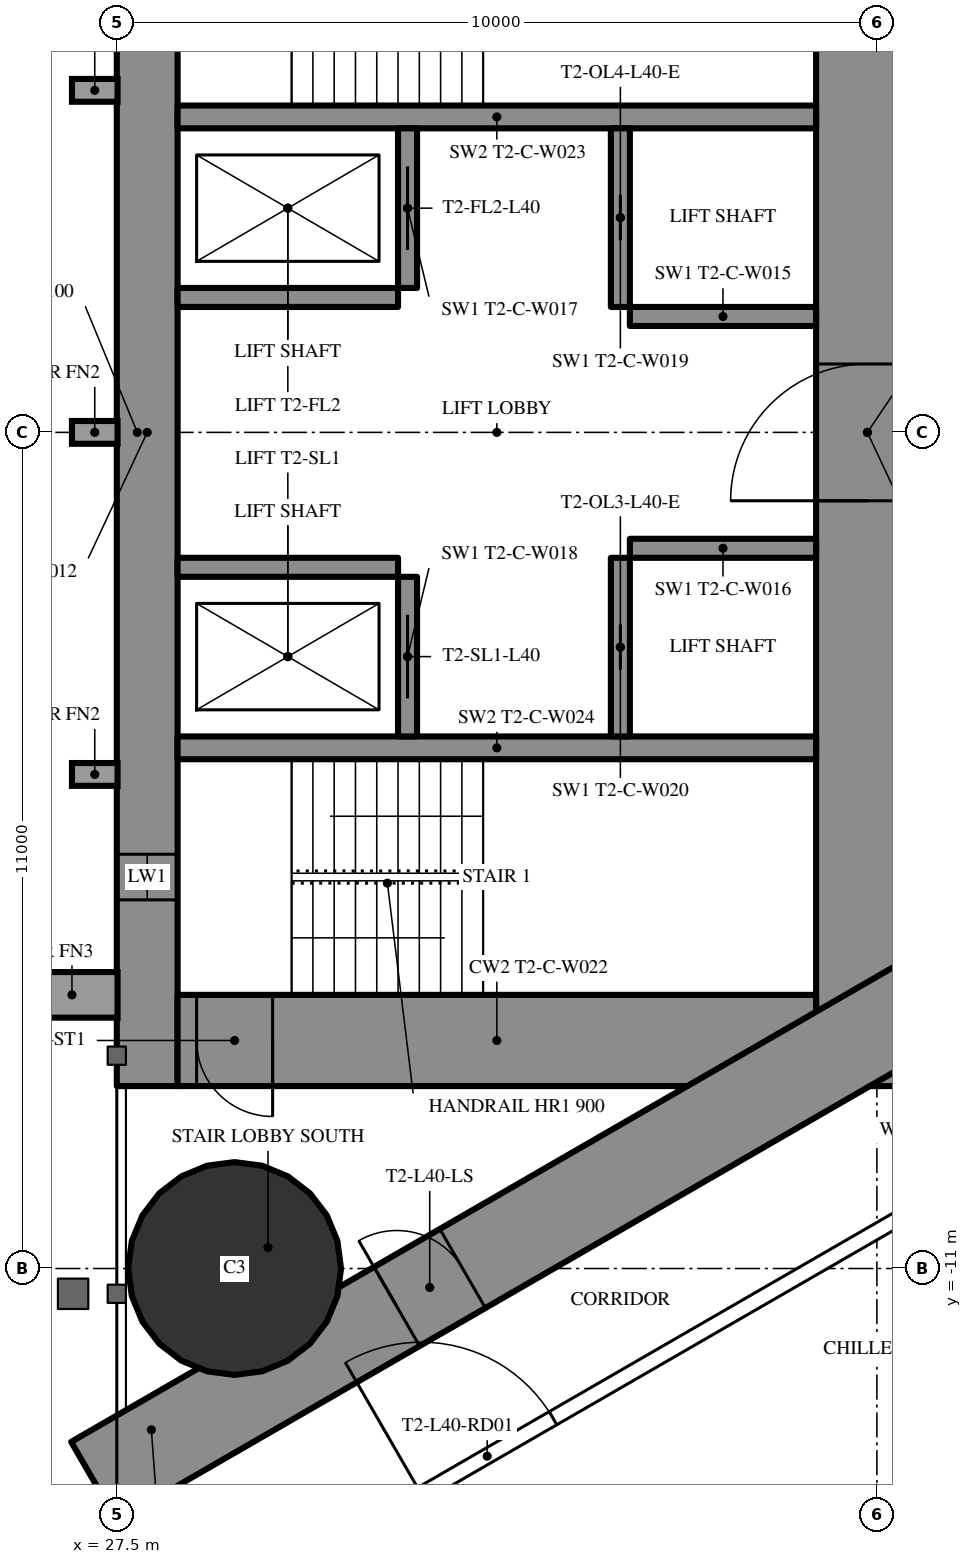
"""IFC4 building model, lengths in metres.
Left out: names, types, materials, properties, quantities, classifications, styles, units other than length and angle.
Written with IfcOpenShell. Run it as: python <this file> out.ifc"""

import sys

from ifc_helpers import new_model, si_unit, direction, frame, frame_2d, origin, origin_2d, place, context, subcontext, project, spatial, rectangle, circle, extrude, element, fill, save


model = new_model("IFC4")
c1 = context("Model", 3, precision=1e-05, world=origin(), true_north=direction((0.0, 1.0)))
c2 = subcontext(c1, "Body", "Model", "MODEL_VIEW")
j1 = project(units=[si_unit("LENGTHUNIT", "METRE"), si_unit("PLANEANGLEUNIT", "RADIAN")], contexts=[c1])
p1 = place(None, origin())
s1 = spatial("IfcSite", under=j1, at=p1, CompositionType="ELEMENT")
p2 = place(p1, origin())
s2 = spatial("IfcBuilding", under=s1, at=p2, CompositionType="ELEMENT")
p3 = place(p2, frame((0.0, 0.0, 152.7)))
s3 = spatial("IfcBuildingStorey", under=s2, at=p3, CompositionType="ELEMENT", Elevation=152.7)
p4 = place(p3, frame((29.05, -11.0, 0.0), z_axis=(0.0, 0.0, 1.0), x_axis=(1.0, 0.0, 0.0)))
e1 = element("IfcColumn", 1, at=p4, inside=s3, PredefinedType="COLUMN", context=c2, shape_type="SweptSolid", body=[
    extrude(circle(Radius=1.4, at=origin_2d()), origin(), (0.0, 0.0, 1.0), 3.6),
])
p5 = place(p3, frame((27.9, -8.6, 0.0), z_axis=(0.0, 0.0, 1.0), x_axis=(0.0, 1.0, 0.0)))
e2 = element("IfcWall", 2, at=p5, inside=s3, PredefinedType="SHEAR", context=c2, shape_type="SweptSolid", body=[
    extrude(rectangle(XDim=17.2, YDim=0.8, at=frame_2d((8.6, 0.0))), origin(), (0.0, 0.0, 1.0), 3.6),
])
p6 = place(p5, frame((2.45, 0.0, 0.6)))
e3 = element("IfcOpeningElement", 3, at=p6, cuts=e2, PredefinedType="OPENING", context=c2, shape_type="SweptSolid", body=[
    extrude(rectangle(XDim=0.6, YDim=2.1, at=frame_2d((0.3, 1.05))), frame((0.0, 0.41, 0.0), z_axis=(0.0, -1.0, 0.0), x_axis=(1.0, 0.0, 0.0)), (0.0, 0.0, 1.0), 0.82),
])
p7 = place(p5, frame((14.15, 0.0, 0.6)))
e4 = element("IfcOpeningElement", 4, at=p7, cuts=e2, PredefinedType="OPENING", context=c2, shape_type="SweptSolid", body=[
    extrude(rectangle(XDim=0.6, YDim=2.1, at=frame_2d((0.3, 1.05))), frame((0.0, 0.41, 0.0), z_axis=(0.0, -1.0, 0.0), x_axis=(1.0, 0.0, 0.0)), (0.0, 0.0, 1.0), 0.82),
])
p8 = place(p3, frame((37.375, -8.6, 0.0), z_axis=(0.0, 0.0, 1.0), x_axis=(0.0, 1.0, 0.0)))
e5 = element("IfcWall", 5, at=p8, inside=s3, PredefinedType="SHEAR", context=c2, shape_type="SweptSolid", body=[
    extrude(rectangle(XDim=17.2, YDim=1.35, at=frame_2d((8.6, 0.0))), origin(), (0.0, 0.0, 1.0), 3.6),
])
p9 = place(p8, frame((7.7, 0.0, 0.0)))
e6 = element("IfcOpeningElement", 6, at=p9, cuts=e5, PredefinedType="OPENING", context=c2, shape_type="SweptSolid", body=[
    extrude(rectangle(XDim=1.8, YDim=2.2, at=frame_2d((0.9, 1.1))), frame((0.0, 0.685, 0.0), z_axis=(0.0, -1.0, 0.0), x_axis=(1.0, 0.0, 0.0)), (0.0, 0.0, 1.0), 1.37),
])
p10 = place(p3, frame((28.3, -8.0, 0.0), z_axis=(0.0, 0.0, 1.0), x_axis=(1.0, 0.0, 0.0)))
e7 = element("IfcWall", 7, at=p10, inside=s3, PredefinedType="SHEAR", context=c2, shape_type="SweptSolid", body=[
    extrude(rectangle(XDim=8.4, YDim=1.2, at=frame_2d((4.2, 0.0))), origin(), (0.0, 0.0, 1.0), 3.6),
])
p11 = place(p10, frame((0.25, 0.0, 0.0)))
e8 = element("IfcOpeningElement", 8, at=p11, cuts=e7, PredefinedType="OPENING", context=c2, shape_type="SweptSolid", body=[
    extrude(rectangle(XDim=1.0, YDim=2.2, at=frame_2d((0.5, 1.1))), frame((0.0, 0.61, 0.0), z_axis=(0.0, -1.0, 0.0), x_axis=(1.0, 0.0, 0.0)), (0.0, 0.0, 1.0), 1.22),
])
for number, where, z_axis, x_axis in (
    (9, (28.3, -4.15, 0.0), (0.0, 0.0, 1.0), (1.0, 0.0, 0.0)),
    (10, (28.3, 4.15, 0.0), (0.0, 0.0, 1.0), (1.0, 0.0, 0.0)),
):
    element("IfcWall", number, at=place(p3, frame(where, z_axis=z_axis, x_axis=x_axis)), inside=s3, PredefinedType="SHEAR", context=c2, shape_type="SweptSolid", body=[
        extrude(rectangle(XDim=8.4, YDim=0.3, at=frame_2d((4.2, 0.0))), origin(), (0.0, 0.0, 1.0), 3.6),
    ])
p12 = place(p3, frame((31.325, -4.0, 0.0), z_axis=(0.0, 0.0, 1.0), x_axis=(0.0, 1.0, 0.0)))
e11 = element("IfcWall", 11, at=p12, inside=s3, PredefinedType="SHEAR", context=c2, shape_type="SweptSolid", body=[
    extrude(rectangle(XDim=2.1, YDim=0.25, at=frame_2d((1.05, 0.0))), origin(), (0.0, 0.0, 1.0), 3.6),
])
p13 = place(p12, frame((0.5, 0.0, 0.0)))
e12 = element("IfcOpeningElement", 12, at=p13, cuts=e11, PredefinedType="OPENING", context=c2, shape_type="SweptSolid", body=[
    extrude(rectangle(XDim=1.1, YDim=2.2, at=frame_2d((0.55, 1.1))), frame((0.0, 0.135, 0.0), z_axis=(0.0, -1.0, 0.0), x_axis=(1.0, 0.0, 0.0)), (0.0, 0.0, 1.0), 0.27),
])
p14 = place(p3, frame((34.125, -4.0, 0.0), z_axis=(0.0, 0.0, 1.0), x_axis=(0.0, 1.0, 0.0)))
e13 = element("IfcWall", 13, at=p14, inside=s3, PredefinedType="SHEAR", context=c2, shape_type="SweptSolid", body=[
    extrude(rectangle(XDim=2.35, YDim=0.25, at=frame_2d((1.175, 0.0))), origin(), (0.0, 0.0, 1.0), 3.6),
])
p15 = place(p14, frame((0.875, 0.0, 0.0)))
e14 = element("IfcOpeningElement", 14, at=p15, cuts=e13, PredefinedType="OPENING", context=c2, shape_type="SweptSolid", body=[
    extrude(rectangle(XDim=0.6, YDim=2.0, at=frame_2d((0.3, 1.0))), frame((0.0, 0.135, 0.0), z_axis=(0.0, -1.0, 0.0), x_axis=(1.0, 0.0, 0.0)), (0.0, 0.0, 1.0), 0.27),
])
p16 = place(p3, frame((28.3, -1.775, 0.0), z_axis=(0.0, 0.0, 1.0), x_axis=(1.0, 0.0, 0.0)))
e15 = element("IfcWall", 15, at=p16, inside=s3, PredefinedType="SHEAR", context=c2, shape_type="SweptSolid", body=[
    extrude(rectangle(XDim=2.9, YDim=0.25, at=frame_2d((1.45, 0.0))), origin(), (0.0, 0.0, 1.0), 3.6),
])
p17 = place(p3, frame((34.25, -1.525, 0.0), z_axis=(0.0, 0.0, 1.0), x_axis=(1.0, 0.0, 0.0)))
e16 = element("IfcWall", 16, at=p17, inside=s3, PredefinedType="SHEAR", context=c2, shape_type="SweptSolid", body=[
    extrude(rectangle(XDim=2.45, YDim=0.25, at=frame_2d((1.225, 0.0))), origin(), (0.0, 0.0, 1.0), 3.6),
])
p18 = place(p3, frame((31.325, 1.9, 0.0), z_axis=(0.0, 0.0, 1.0), x_axis=(0.0, 1.0, 0.0)))
e17 = element("IfcWall", 17, at=p18, inside=s3, PredefinedType="SHEAR", context=c2, shape_type="SweptSolid", body=[
    extrude(rectangle(XDim=2.1, YDim=0.25, at=frame_2d((1.05, 0.0))), origin(), (0.0, 0.0, 1.0), 3.6),
])
p19 = place(p18, frame((0.5, 0.0, 0.0)))
e18 = element("IfcOpeningElement", 18, at=p19, cuts=e17, PredefinedType="OPENING", context=c2, shape_type="SweptSolid", body=[
    extrude(rectangle(XDim=1.1, YDim=2.2, at=frame_2d((0.55, 1.1))), frame((0.0, 0.135, 0.0), z_axis=(0.0, -1.0, 0.0), x_axis=(1.0, 0.0, 0.0)), (0.0, 0.0, 1.0), 0.27),
])
p20 = place(p3, frame((34.125, 1.65, 0.0), z_axis=(0.0, 0.0, 1.0), x_axis=(0.0, 1.0, 0.0)))
e19 = element("IfcWall", 19, at=p20, inside=s3, PredefinedType="SHEAR", context=c2, shape_type="SweptSolid", body=[
    extrude(rectangle(XDim=2.35, YDim=0.25, at=frame_2d((1.175, 0.0))), origin(), (0.0, 0.0, 1.0), 3.6),
])
p21 = place(p20, frame((0.875, 0.0, 0.0)))
e20 = element("IfcOpeningElement", 20, at=p21, cuts=e19, PredefinedType="OPENING", context=c2, shape_type="SweptSolid", body=[
    extrude(rectangle(XDim=0.6, YDim=2.0, at=frame_2d((0.3, 1.0))), frame((0.0, 0.135, 0.0), z_axis=(0.0, -1.0, 0.0), x_axis=(1.0, 0.0, 0.0)), (0.0, 0.0, 1.0), 0.27),
])
p22 = place(p3, frame((28.3, 1.775, 0.0), z_axis=(0.0, 0.0, 1.0), x_axis=(1.0, 0.0, 0.0)))
e21 = element("IfcWall", 21, at=p22, inside=s3, PredefinedType="SHEAR", context=c2, shape_type="SweptSolid", body=[
    extrude(rectangle(XDim=2.9, YDim=0.25, at=frame_2d((1.45, 0.0))), origin(), (0.0, 0.0, 1.0), 3.6),
])
p23 = place(p3, frame((34.25, 1.525, 0.0), z_axis=(0.0, 0.0, 1.0), x_axis=(1.0, 0.0, 0.0)))
e22 = element("IfcWall", 22, at=p23, inside=s3, PredefinedType="SHEAR", context=c2, shape_type="SweptSolid", body=[
    extrude(rectangle(XDim=2.45, YDim=0.25, at=frame_2d((1.225, 0.0))), origin(), (0.0, 0.0, 1.0), 3.6),
])
p24 = place(p3, frame((27.2, -13.8, 0.0), z_axis=(0.0, 0.0, 1.0), x_axis=(0.866027159892, 0.499996958321, 0.0)))
e23 = element("IfcWall", 23, at=p24, inside=s3, PredefinedType="SHEAR", context=c2, shape_type="SweptSolid", body=[
    extrude(rectangle(XDim=27.947, YDim=1.2, at=frame_2d((13.973, 0.0))), origin(), (0.0, 0.0, 1.0), 3.6),
])
p25 = place(p24, frame((4.6, 0.0, 0.0)))
e24 = element("IfcOpeningElement", 24, at=p25, cuts=e23, PredefinedType="OPENING", context=c2, shape_type="SweptSolid", body=[
    extrude(rectangle(XDim=1.0, YDim=2.2, at=frame_2d((0.5, 1.1))), frame((0.0, 0.61, 0.0), z_axis=(0.0, -1.0, 0.0), x_axis=(1.0, 0.0, 0.0)), (0.0, 0.0, 1.0), 1.22),
])
p26 = place(p24, frame((13.568, 0.0, 0.0)))
e25 = element("IfcOpeningElement", 25, at=p26, cuts=e23, PredefinedType="OPENING", context=c2, shape_type="SweptSolid", body=[
    extrude(rectangle(XDim=1.8, YDim=2.04, at=frame_2d((0.9, 1.02))), frame((0.0, 0.61, 0.0), z_axis=(0.0, -1.0, 0.0), x_axis=(1.0, 0.0, 0.0)), (0.0, 0.0, 1.0), 1.22),
])
p27 = place(p3, frame((27.2, 13.8, 0.0), z_axis=(0.0, 0.0, 1.0), x_axis=(0.866024515034, -0.500001539357, 0.0)))
e26 = element("IfcWall", 26, at=p27, inside=s3, PredefinedType="SHEAR", context=c2, shape_type="SweptSolid", body=[
    extrude(rectangle(XDim=26.907, YDim=1.2, at=frame_2d((13.454, 0.0))), origin(), (0.0, 0.0, 1.0), 3.6),
])
p28 = place(p27, frame((4.6, 0.0, 0.0)))
e27 = element("IfcOpeningElement", 27, at=p28, cuts=e26, PredefinedType="OPENING", context=c2, shape_type="SweptSolid", body=[
    extrude(rectangle(XDim=1.0, YDim=2.2, at=frame_2d((0.5, 1.1))), frame((0.0, 0.61, 0.0), z_axis=(0.0, -1.0, 0.0), x_axis=(1.0, 0.0, 0.0)), (0.0, 0.0, 1.0), 1.22),
])
p29 = place(p27, frame((13.568, 0.0, 0.0)))
e28 = element("IfcOpeningElement", 28, at=p29, cuts=e26, PredefinedType="OPENING", context=c2, shape_type="SweptSolid", body=[
    extrude(rectangle(XDim=1.8, YDim=2.04, at=frame_2d((0.9, 1.02))), frame((0.0, 0.61, 0.0), z_axis=(0.0, -1.0, 0.0), x_axis=(1.0, 0.0, 0.0)), (0.0, 0.0, 1.0), 1.22),
])
p30 = place(p3, frame((27.903, -16.05, 0.0), z_axis=(0.0, 0.0, 1.0), x_axis=(0.86602417537, 0.500002127671, 0.0)))
e29 = element("IfcWall", 29, at=p30, inside=s3, PredefinedType="PARTITIONING", context=c2, shape_type="SweptSolid", body=[
    extrude(rectangle(XDim=24.307, YDim=0.2, at=frame_2d((12.153, 0.0))), origin(), (0.0, 0.0, 1.0), 3.35),
])
p31 = place(p30, frame((4.162, 0.0, 0.0)))
e30 = element("IfcOpeningElement", 30, at=p31, cuts=e29, PredefinedType="OPENING", context=c2, shape_type="SweptSolid", body=[
    extrude(rectangle(XDim=2.0, YDim=2.4, at=frame_2d((1.0, 1.2))), frame((0.0, 0.11, 0.0), z_axis=(0.0, -1.0, 0.0), x_axis=(1.0, 0.0, 0.0)), (0.0, 0.0, 1.0), 0.22),
])
p32 = place(p30, frame((17.678, 0.0, 0.0)))
e31 = element("IfcOpeningElement", 31, at=p32, cuts=e29, PredefinedType="OPENING", context=c2, shape_type="SweptSolid", body=[
    extrude(rectangle(XDim=2.0, YDim=2.4, at=frame_2d((1.0, 1.2))), frame((0.0, 0.11, 0.0), z_axis=(0.0, -1.0, 0.0), x_axis=(1.0, 0.0, 0.0)), (0.0, 0.0, 1.0), 0.22),
])
p33 = place(p31, origin())
e32 = element("IfcDoor", 32, at=p33, inside=s3, OperationType="DOUBLE_DOOR_SINGLE_SWING", PredefinedType="DOOR", context=c2, shape_type="SweptSolid", body=[
    extrude(rectangle(XDim=2.0, YDim=2.4, at=frame_2d((1.0, 1.2))), frame((0.0, 0.025, 0.0), z_axis=(0.0, -1.0, 0.0), x_axis=(1.0, 0.0, 0.0)), (0.0, 0.0, 1.0), 0.05),
])
fill(e30, e32)
p34 = place(p25, origin())
e33 = element("IfcDoor", 33, at=p34, inside=s3, OperationType="SINGLE_SWING_LEFT", PredefinedType="DOOR", context=c2, shape_type="SweptSolid", body=[
    extrude(rectangle(XDim=1.0, YDim=2.2, at=frame_2d((0.5, 1.1))), frame((0.0, 0.025, 0.0), z_axis=(0.0, -1.0, 0.0), x_axis=(1.0, 0.0, 0.0)), (0.0, 0.0, 1.0), 0.05),
])
fill(e24, e33)
p35 = place(p9, origin())
e34 = element("IfcDoor", 34, at=p35, inside=s3, OperationType="DOUBLE_DOOR_SINGLE_SWING", PredefinedType="DOOR", context=c2, shape_type="SweptSolid", body=[
    extrude(rectangle(XDim=1.8, YDim=2.2, at=frame_2d((0.9, 1.1))), frame((0.0, 0.025, 0.0), z_axis=(0.0, -1.0, 0.0), x_axis=(1.0, 0.0, 0.0)), (0.0, 0.0, 1.0), 0.05),
])
fill(e6, e34)
p36 = place(p11, origin())
e35 = element("IfcDoor", 35, at=p36, inside=s3, OperationType="SINGLE_SWING_RIGHT", PredefinedType="DOOR", context=c2, shape_type="SweptSolid", body=[
    extrude(rectangle(XDim=1.0, YDim=2.2, at=frame_2d((0.5, 1.1))), frame((0.0, 0.025, 0.0), z_axis=(0.0, -1.0, 0.0), x_axis=(1.0, 0.0, 0.0)), (0.0, 0.0, 1.0), 0.05),
])
fill(e8, e35)
p37 = place(p13, origin())
e36 = element("IfcDoor", 36, at=p37, inside=s3, OperationType="SLIDING_TO_LEFT", PredefinedType="USERDEFINED", context=c2, shape_type="SweptSolid", body=[
    extrude(rectangle(XDim=1.1, YDim=2.2, at=frame_2d((0.55, 1.1))), frame((0.0, 0.025, 0.0), z_axis=(0.0, -1.0, 0.0), x_axis=(1.0, 0.0, 0.0)), (0.0, 0.0, 1.0), 0.05),
])
fill(e12, e36)
p38 = place(p19, origin())
e37 = element("IfcDoor", 37, at=p38, inside=s3, OperationType="SLIDING_TO_LEFT", PredefinedType="USERDEFINED", context=c2, shape_type="SweptSolid", body=[
    extrude(rectangle(XDim=1.1, YDim=2.2, at=frame_2d((0.55, 1.1))), frame((0.0, 0.025, 0.0), z_axis=(0.0, -1.0, 0.0), x_axis=(1.0, 0.0, 0.0)), (0.0, 0.0, 1.0), 0.05),
])
fill(e18, e37)
p39 = place(p15, origin())
e38 = element("IfcDoor", 38, at=p39, inside=s3, OperationType="SLIDING_TO_LEFT", PredefinedType="DOOR", context=c2, shape_type="SweptSolid", body=[
    extrude(rectangle(XDim=0.6, YDim=2.0, at=frame_2d((0.3, 1.0))), frame((0.0, 0.025, 0.0), z_axis=(0.0, -1.0, 0.0), x_axis=(1.0, 0.0, 0.0)), (0.0, 0.0, 1.0), 0.05),
])
fill(e14, e38)
p40 = place(p21, origin())
e39 = element("IfcDoor", 39, at=p40, inside=s3, OperationType="SLIDING_TO_LEFT", PredefinedType="DOOR", context=c2, shape_type="SweptSolid", body=[
    extrude(rectangle(XDim=0.6, YDim=2.0, at=frame_2d((0.3, 1.0))), frame((0.0, 0.025, 0.0), z_axis=(0.0, -1.0, 0.0), x_axis=(1.0, 0.0, 0.0)), (0.0, 0.0, 1.0), 0.05),
])
fill(e20, e39)
p41 = place(p6, origin())
e40 = element("IfcWindow", 40, at=p41, inside=s3, PartitioningType="SINGLE_PANEL", PredefinedType="WINDOW", context=c2, shape_type="SweptSolid", body=[
    extrude(rectangle(XDim=0.6, YDim=2.1, at=frame_2d((0.3, 1.05))), frame((0.0, 0.03, 0.0), z_axis=(0.0, -1.0, 0.0), x_axis=(1.0, 0.0, 0.0)), (0.0, 0.0, 1.0), 0.06),
])
fill(e3, e40)
save(model, sys.argv[1])
